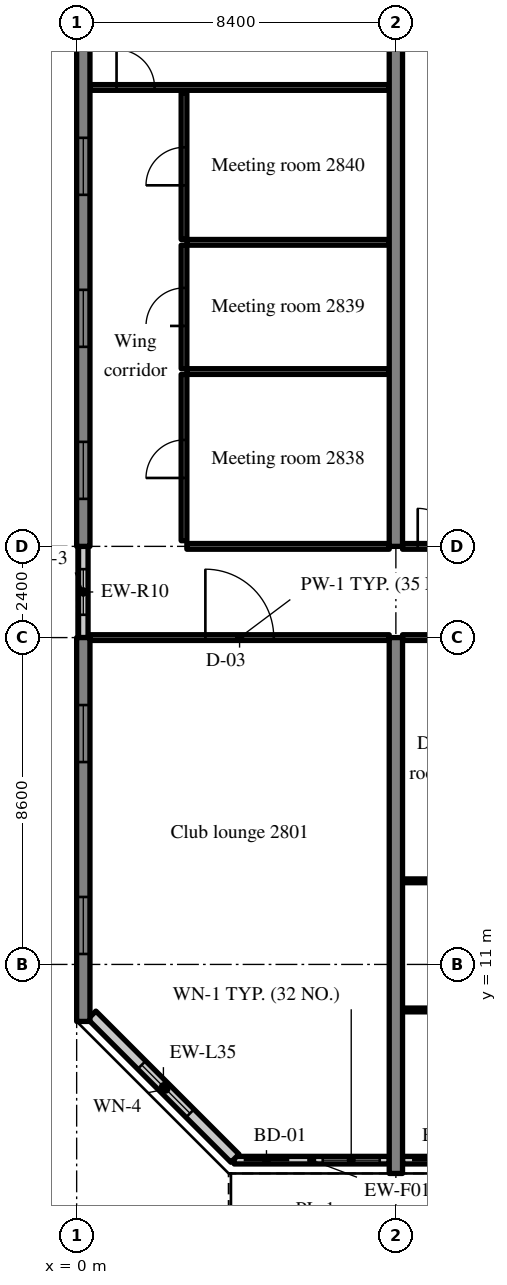
"""IFC4 building model, lengths in metres.
Left out: names, types, materials, properties, quantities, classifications, styles, units other than length and angle.
Written with IfcOpenShell. Run it as: python <this file> out.ifc"""

import sys

from ifc_helpers import new_model, si_unit, direction, frame, frame_2d, origin, place, context, subcontext, project, spatial, rectangle, extrude, source, transform, mapped, element, fill, save


model = new_model("IFC4")
c1 = context("Model", 3, precision=1e-05, world=origin(), true_north=direction((0.0, 1.0)))
c2 = subcontext(c1, "Body", "Model", "MODEL_VIEW")
j1 = project(units=[si_unit("LENGTHUNIT", "METRE"), si_unit("PLANEANGLEUNIT", "RADIAN")], contexts=[c1])
p1 = place(None, origin())
s1 = spatial("IfcSite", under=j1, at=p1, CompositionType="ELEMENT")
p2 = place(p1, origin())
s2 = spatial("IfcBuilding", under=s1, at=p2, CompositionType="ELEMENT")
p3 = place(p2, frame((0.0, 0.0, 118.0)))
s3 = spatial("IfcBuildingStorey", under=s2, at=p3, CompositionType="ELEMENT", Elevation=118.0)
m1 = source(origin(), c2, "Body", "SweptSolid", [
    extrude(rectangle(XDim=10.1, YDim=0.35, at=frame_2d((5.05, 0.0))), origin(), (0.0, 0.0, 1.0), 3.52),
])
p4 = place(p3, frame((0.175, 9.5, 0.0), z_axis=(0.0, 0.0, 1.0), x_axis=(0.0, 1.0, 0.0)))
e1 = element("IfcWall", 1, at=p4, inside=s3, PredefinedType="SHEAR", context=c2, shape_type="MappedRepresentation", body=[
    mapped(m1, transform((0.0, 0.0, 0.0), scale=1.0)),
])
m2 = source(origin(), c2, "Body", "SweptSolid", [
    extrude(rectangle(XDim=1.5, YDim=1.5, at=frame_2d((0.75, 0.75))), frame((0.0, 0.185, 0.0), z_axis=(0.0, -1.0, 0.0), x_axis=(1.0, 0.0, 0.0)), (0.0, 0.0, 1.0), 0.37),
])
p5 = place(p4, frame((1.775, 0.0, 0.9)))
e2 = element("IfcOpeningElement", 2, at=p5, cuts=e1, PredefinedType="OPENING", context=c2, shape_type="MappedRepresentation", body=[
    mapped(m2, transform((0.0, 0.0, 0.0), scale=1.0)),
])
p6 = place(p4, frame((6.825, 0.0, 0.9)))
e3 = element("IfcOpeningElement", 3, at=p6, cuts=e1, PredefinedType="OPENING", context=c2, shape_type="MappedRepresentation", body=[
    mapped(m2, transform((0.0, 0.0, 0.0), scale=1.0)),
])
m3 = source(origin(), c2, "Body", "SweptSolid", [
    extrude(rectangle(XDim=16.0, YDim=0.35, at=frame_2d((8.0, 0.0))), origin(), (0.0, 0.0, 1.0), 3.52),
])
p7 = place(p3, frame((0.175, 22.0, 0.0), z_axis=(0.0, 0.0, 1.0), x_axis=(0.0, 1.0, 0.0)))
e4 = element("IfcWall", 4, at=p7, inside=s3, PredefinedType="SHEAR", context=c2, shape_type="MappedRepresentation", body=[
    mapped(m3, transform((0.0, 0.0, 0.0), scale=1.0)),
])
p8 = place(p7, frame((1.25, 0.0, 0.9)))
e5 = element("IfcOpeningElement", 5, at=p8, cuts=e4, PredefinedType="OPENING", context=c2, shape_type="MappedRepresentation", body=[
    mapped(m2, transform((0.0, 0.0, 0.0), scale=1.0)),
])
p9 = place(p7, frame((5.25, 0.0, 0.9)))
e6 = element("IfcOpeningElement", 6, at=p9, cuts=e4, PredefinedType="OPENING", context=c2, shape_type="MappedRepresentation", body=[
    mapped(m2, transform((0.0, 0.0, 0.0), scale=1.0)),
])
p10 = place(p7, frame((9.25, 0.0, 0.9)))
e7 = element("IfcOpeningElement", 7, at=p10, cuts=e4, PredefinedType="OPENING", context=c2, shape_type="MappedRepresentation", body=[
    mapped(m2, transform((0.0, 0.0, 0.0), scale=1.0)),
])
p11 = place(p7, frame((13.25, 0.0, 0.9)))
e8 = element("IfcOpeningElement", 8, at=p11, cuts=e4, PredefinedType="OPENING", context=c2, shape_type="MappedRepresentation", body=[
    mapped(m2, transform((0.0, 0.0, 0.0), scale=1.0)),
])
m4 = source(origin(), c2, "Body", "SweptSolid", [
    extrude(rectangle(XDim=14.1, YDim=0.35, at=frame_2d((7.05, 0.0))), origin(), (0.0, 0.0, 1.0), 3.52),
])
p12 = place(p3, frame((8.4, 5.5, 0.0), z_axis=(0.0, 0.0, 1.0), x_axis=(0.0, 1.0, 0.0)))
e9 = element("IfcWall", 9, at=p12, inside=s3, PredefinedType="SHEAR", context=c2, shape_type="MappedRepresentation", body=[
    mapped(m4, transform((0.0, 0.0, 0.0), scale=1.0)),
])
m5 = source(origin(), c2, "Body", "SweptSolid", [
    extrude(rectangle(XDim=20.0, YDim=0.35, at=frame_2d((10.0, 0.0))), origin(), (0.0, 0.0, 1.0), 3.52),
])
p13 = place(p3, frame((8.4, 22.0, 0.0), z_axis=(0.0, 0.0, 1.0), x_axis=(0.0, 1.0, 0.0)))
e10 = element("IfcWall", 10, at=p13, inside=s3, PredefinedType="SHEAR", context=c2, shape_type="MappedRepresentation", body=[
    mapped(m5, transform((0.0, 0.0, 0.0), scale=1.0)),
])
m6 = source(origin(), c2, "Body", "SweptSolid", [
    extrude(rectangle(XDim=4.08, YDim=0.2, at=frame_2d((2.04, 0.0))), origin(), (0.0, 0.0, 1.0), 2.82),
])
p14 = place(p3, frame((4.145, 5.85, 0.0), z_axis=(0.0, 0.0, 1.0), x_axis=(1.0, 0.0, 0.0)))
e11 = element("IfcWall", 11, at=p14, inside=s3, PredefinedType="SOLIDWALL", context=c2, shape_type="MappedRepresentation", body=[
    mapped(m6, transform((0.0, 0.0, 0.0), scale=1.0)),
])
m7 = source(origin(), c2, "Body", "SweptSolid", [
    extrude(rectangle(XDim=1.2, YDim=2.4, at=frame_2d((0.6, 1.2))), frame((0.0, 0.11, 0.0), z_axis=(0.0, -1.0, 0.0), x_axis=(1.0, 0.0, 0.0)), (0.0, 0.0, 1.0), 0.22),
])
p15 = place(p14, frame((0.25, 0.0, 0.0)))
e12 = element("IfcOpeningElement", 12, at=p15, cuts=e11, PredefinedType="OPENING", context=c2, shape_type="MappedRepresentation", body=[
    mapped(m7, transform((0.0, 0.0, 0.0), scale=1.0)),
])
m8 = source(origin(), c2, "Body", "SweptSolid", [
    extrude(rectangle(XDim=1.5, YDim=1.5, at=frame_2d((0.75, 0.75))), frame((0.0, 0.11, 0.0), z_axis=(0.0, -1.0, 0.0), x_axis=(1.0, 0.0, 0.0)), (0.0, 0.0, 1.0), 0.22),
])
p16 = place(p14, frame((2.33, 0.0, 0.9)))
e13 = element("IfcOpeningElement", 13, at=p16, cuts=e11, PredefinedType="OPENING", context=c2, shape_type="MappedRepresentation", body=[
    mapped(m8, transform((0.0, 0.0, 0.0), scale=1.0)),
])
m9 = source(origin(), c2, "Body", "SweptSolid", [
    extrude(rectangle(XDim=8.05, YDim=0.2, at=frame_2d((4.025, 0.0))), origin(), (0.0, 0.0, 1.0), 2.82),
])
p17 = place(p3, frame((8.575, 5.85, 0.0), z_axis=(0.0, 0.0, 1.0), x_axis=(1.0, 0.0, 0.0)))
e14 = element("IfcWall", 14, at=p17, inside=s3, PredefinedType="SOLIDWALL", context=c2, shape_type="MappedRepresentation", body=[
    mapped(m9, transform((0.0, 0.0, 0.0), scale=1.0)),
])
p18 = place(p17, frame((0.25, 0.0, 0.0)))
e15 = element("IfcOpeningElement", 15, at=p18, cuts=e14, PredefinedType="OPENING", context=c2, shape_type="MappedRepresentation", body=[
    mapped(m7, transform((0.0, 0.0, 0.0), scale=1.0)),
])
p19 = place(p17, frame((2.275, 0.0, 0.9)))
e16 = element("IfcOpeningElement", 16, at=p19, cuts=e14, PredefinedType="OPENING", context=c2, shape_type="MappedRepresentation", body=[
    mapped(m8, transform((0.0, 0.0, 0.0), scale=1.0)),
])
p20 = place(p17, frame((4.275, 0.0, 0.0)))
e17 = element("IfcOpeningElement", 17, at=p20, cuts=e14, PredefinedType="OPENING", context=c2, shape_type="MappedRepresentation", body=[
    mapped(m7, transform((0.0, 0.0, 0.0), scale=1.0)),
])
p21 = place(p17, frame((6.3, 0.0, 0.9)))
e18 = element("IfcOpeningElement", 18, at=p21, cuts=e14, PredefinedType="OPENING", context=c2, shape_type="MappedRepresentation", body=[
    mapped(m8, transform((0.0, 0.0, 0.0), scale=1.0)),
])
m10 = source(origin(), c2, "Body", "SweptSolid", [
    extrude(rectangle(XDim=5.326, YDim=0.3, at=frame_2d((2.663, 0.0))), origin(), (0.0, 0.0, 1.0), 3.52),
])
p22 = place(p3, frame((0.4, 9.666, 0.0), z_axis=(0.0, 0.0, 1.0), x_axis=(0.707106781187, -0.707106781187, 0.0)))
e19 = element("IfcWall", 19, at=p22, inside=s3, PredefinedType="SOLIDWALL", context=c2, shape_type="MappedRepresentation", body=[
    mapped(m10, transform((0.0, 0.0, 0.0), scale=1.0)),
])
m11 = source(origin(), c2, "Body", "SweptSolid", [
    extrude(rectangle(XDim=1.8, YDim=1.5, at=frame_2d((0.9, 0.75))), frame((0.0, 0.16, 0.0), z_axis=(0.0, -1.0, 0.0), x_axis=(1.0, 0.0, 0.0)), (0.0, 0.0, 1.0), 0.32),
])
p23 = place(p22, frame((1.854, 0.0, 0.9)))
e20 = element("IfcOpeningElement", 20, at=p23, cuts=e19, PredefinedType="OPENING", context=c2, shape_type="MappedRepresentation", body=[
    mapped(m11, transform((0.0, 0.0, 0.0), scale=1.0)),
])
m12 = source(origin(), c2, "Body", "SweptSolid", [
    extrude(rectangle(XDim=2.4, YDim=0.25, at=frame_2d((1.2, 0.0))), origin(), (0.0, 0.0, 1.0), 2.62),
])
p24 = place(p3, frame((0.175, 19.6, 0.0), z_axis=(0.0, 0.0, 1.0), x_axis=(0.0, 1.0, 0.0)))
e21 = element("IfcWall", 21, at=p24, inside=s3, PredefinedType="SOLIDWALL", context=c2, shape_type="MappedRepresentation", body=[
    mapped(m12, transform((0.0, 0.0, 0.0), scale=1.0)),
])
m13 = source(origin(), c2, "Body", "SweptSolid", [
    extrude(rectangle(XDim=1.2, YDim=1.5, at=frame_2d((0.6, 0.75))), frame((0.0, 0.135, 0.0), z_axis=(0.0, -1.0, 0.0), x_axis=(1.0, 0.0, 0.0)), (0.0, 0.0, 1.0), 0.27),
])
p25 = place(p24, frame((0.6, 0.0, 0.9)))
e22 = element("IfcOpeningElement", 22, at=p25, cuts=e21, PredefinedType="OPENING", context=c2, shape_type="MappedRepresentation", body=[
    mapped(m13, transform((0.0, 0.0, 0.0), scale=1.0)),
])
m14 = source(origin(), c2, "Body", "SweptSolid", [
    extrude(rectangle(XDim=7.875, YDim=0.15, at=frame_2d((3.938, 0.0))), origin(), (0.0, 0.0, 1.0), 2.82),
])
p26 = place(p3, frame((0.35, 19.6, 0.0), z_axis=(0.0, 0.0, 1.0), x_axis=(1.0, 0.0, 0.0)))
e23 = element("IfcWall", 23, at=p26, inside=s3, PredefinedType="PARTITIONING", context=c2, shape_type="MappedRepresentation", body=[
    mapped(m14, transform((0.0, 0.0, 0.0), scale=1.0)),
])
m15 = source(origin(), c2, "Body", "SweptSolid", [
    extrude(rectangle(XDim=1.8, YDim=2.1, at=frame_2d((0.9, 1.05))), frame((0.0, 0.085, 0.0), z_axis=(0.0, -1.0, 0.0), x_axis=(1.0, 0.0, 0.0)), (0.0, 0.0, 1.0), 0.17),
])
p27 = place(p26, frame((3.037, 0.0, 0.0)))
e24 = element("IfcOpeningElement", 24, at=p27, cuts=e23, PredefinedType="OPENING", context=c2, shape_type="MappedRepresentation", body=[
    mapped(m15, transform((0.0, 0.0, 0.0), scale=1.0)),
])
m16 = source(origin(), c2, "Body", "SweptSolid", [
    extrude(rectangle(XDim=2.6, YDim=0.1, at=frame_2d((1.3, 0.0))), origin(), (0.0, 0.0, 1.0), 3.52),
])
p28 = place(p3, frame((8.575, 13.2, 0.0), z_axis=(0.0, 0.0, 1.0), x_axis=(1.0, 0.0, 0.0)))
e25 = element("IfcWall", 25, at=p28, inside=s3, PredefinedType="PARTITIONING", context=c2, shape_type="MappedRepresentation", body=[
    mapped(m16, transform((0.0, 0.0, 0.0), scale=1.0)),
])
m17 = source(origin(), c2, "Body", "SweptSolid", [
    extrude(rectangle(XDim=0.9, YDim=2.1, at=frame_2d((0.45, 1.05))), frame((0.0, 0.06, 0.0), z_axis=(0.0, -1.0, 0.0), x_axis=(1.0, 0.0, 0.0)), (0.0, 0.0, 1.0), 0.12),
])
p29 = place(p28, frame((0.85, 0.0, 0.0)))
e26 = element("IfcOpeningElement", 26, at=p29, cuts=e25, PredefinedType="OPENING", context=c2, shape_type="MappedRepresentation", body=[
    mapped(m17, transform((0.0, 0.0, 0.0), scale=1.0)),
])
m18 = source(origin(), c2, "Body", "SweptSolid", [
    extrude(rectangle(XDim=8.05, YDim=0.1, at=frame_2d((4.025, 0.0))), origin(), (0.0, 0.0, 1.0), 3.52),
])
p30 = place(p3, frame((8.575, 9.802, 0.0), z_axis=(0.0, 0.0, 1.0), x_axis=(1.0, 0.0, 0.0)))
e27 = element("IfcWall", 27, at=p30, inside=s3, PredefinedType="PARTITIONING", context=c2, shape_type="MappedRepresentation", body=[
    mapped(m18, transform((0.0, 0.0, 0.0), scale=1.0)),
])
m19 = source(origin(), c2, "Body", "SweptSolid", [
    extrude(rectangle(XDim=1.8, YDim=2.1, at=frame_2d((0.9, 1.05))), frame((0.0, 0.06, 0.0), z_axis=(0.0, -1.0, 0.0), x_axis=(1.0, 0.0, 0.0)), (0.0, 0.0, 1.0), 0.12),
])
p31 = place(p30, frame((3.125, 0.0, 0.0)))
e28 = element("IfcOpeningElement", 28, at=p31, cuts=e27, PredefinedType="OPENING", context=c2, shape_type="MappedRepresentation", body=[
    mapped(m19, transform((0.0, 0.0, 0.0), scale=1.0)),
])
m20 = source(origin(), c2, "Body", "SweptSolid", [
    extrude(rectangle(XDim=8.05, YDim=0.15, at=frame_2d((4.025, 0.0))), origin(), (0.0, 0.0, 1.0), 2.82),
])
p32 = place(p3, frame((8.575, 19.6, 0.0), z_axis=(0.0, 0.0, 1.0), x_axis=(1.0, 0.0, 0.0)))
e29 = element("IfcWall", 29, at=p32, inside=s3, PredefinedType="PARTITIONING", context=c2, shape_type="MappedRepresentation", body=[
    mapped(m20, transform((0.0, 0.0, 0.0), scale=1.0)),
])
m21 = source(origin(), c2, "Body", "SweptSolid", [
    extrude(rectangle(XDim=1.0, YDim=2.1, at=frame_2d((0.5, 1.05))), frame((0.0, 0.085, 0.0), z_axis=(0.0, -1.0, 0.0), x_axis=(1.0, 0.0, 0.0)), (0.0, 0.0, 1.0), 0.17),
])
p33 = place(p32, frame((6.65, 0.0, 0.0)))
e30 = element("IfcOpeningElement", 30, at=p33, cuts=e29, PredefinedType="OPENING", context=c2, shape_type="MappedRepresentation", body=[
    mapped(m21, transform((0.0, 0.0, 0.0), scale=1.0)),
])
m22 = source(origin(), c2, "Body", "SweptSolid", [
    extrude(rectangle(XDim=5.325, YDim=0.15, at=frame_2d((2.663, 0.0))), origin(), (0.0, 0.0, 1.0), 2.82),
])
p34 = place(p3, frame((2.9, 22.0, 0.0), z_axis=(0.0, 0.0, 1.0), x_axis=(1.0, 0.0, 0.0)))
e31 = element("IfcWall", 31, at=p34, inside=s3, PredefinedType="PARTITIONING", context=c2, shape_type="MappedRepresentation", body=[
    mapped(m22, transform((0.0, 0.0, 0.0), scale=1.0)),
])
m23 = source(origin(), c2, "Body", "SweptSolid", [
    extrude(rectangle(XDim=4.375, YDim=0.15, at=frame_2d((2.188, 0.0))), origin(), (0.0, 0.0, 1.0), 3.52),
])
p35 = place(p3, frame((2.825, 22.15, 0.0), z_axis=(0.0, 0.0, 1.0), x_axis=(0.0, 1.0, 0.0)))
e32 = element("IfcWall", 32, at=p35, inside=s3, PredefinedType="PARTITIONING", context=c2, shape_type="MappedRepresentation", body=[
    mapped(m23, transform((0.0, 0.0, 0.0), scale=1.0)),
])
p36 = place(p35, frame((1.65, 0.0, 0.0)))
e33 = element("IfcOpeningElement", 33, at=p36, cuts=e32, PredefinedType="OPENING", context=c2, shape_type="MappedRepresentation", body=[
    mapped(m21, transform((0.0, 0.0, 0.0), scale=1.0)),
])
m24 = source(origin(), c2, "Body", "SweptSolid", [
    extrude(rectangle(XDim=5.325, YDim=0.15, at=frame_2d((2.663, 0.0))), origin(), (0.0, 0.0, 1.0), 3.52),
])
p37 = place(p3, frame((2.9, 26.6, 0.0), z_axis=(0.0, 0.0, 1.0), x_axis=(1.0, 0.0, 0.0)))
e34 = element("IfcWall", 34, at=p37, inside=s3, PredefinedType="PARTITIONING", context=c2, shape_type="MappedRepresentation", body=[
    mapped(m24, transform((0.0, 0.0, 0.0), scale=1.0)),
])
m25 = source(origin(), c2, "Body", "SweptSolid", [
    extrude(rectangle(XDim=3.25, YDim=0.15, at=frame_2d((1.625, 0.0))), origin(), (0.0, 0.0, 1.0), 3.52),
])
p38 = place(p3, frame((2.825, 26.675, 0.0), z_axis=(0.0, 0.0, 1.0), x_axis=(0.0, 1.0, 0.0)))
e35 = element("IfcWall", 35, at=p38, inside=s3, PredefinedType="PARTITIONING", context=c2, shape_type="MappedRepresentation", body=[
    mapped(m25, transform((0.0, 0.0, 0.0), scale=1.0)),
])
p39 = place(p38, frame((1.125, 0.0, 0.0)))
e36 = element("IfcOpeningElement", 36, at=p39, cuts=e35, PredefinedType="OPENING", context=c2, shape_type="MappedRepresentation", body=[
    mapped(m21, transform((0.0, 0.0, 0.0), scale=1.0)),
])
p40 = place(p3, frame((2.9, 30.0, 0.0), z_axis=(0.0, 0.0, 1.0), x_axis=(1.0, 0.0, 0.0)))
e37 = element("IfcWall", 37, at=p40, inside=s3, PredefinedType="PARTITIONING", context=c2, shape_type="MappedRepresentation", body=[
    mapped(m24, transform((0.0, 0.0, 0.0), scale=1.0)),
])
m26 = source(origin(), c2, "Body", "SweptSolid", [
    extrude(rectangle(XDim=3.85, YDim=0.15, at=frame_2d((1.925, 0.0))), origin(), (0.0, 0.0, 1.0), 3.52),
])
p41 = place(p3, frame((2.825, 30.075, 0.0), z_axis=(0.0, 0.0, 1.0), x_axis=(0.0, 1.0, 0.0)))
e38 = element("IfcWall", 38, at=p41, inside=s3, PredefinedType="PARTITIONING", context=c2, shape_type="MappedRepresentation", body=[
    mapped(m26, transform((0.0, 0.0, 0.0), scale=1.0)),
])
p42 = place(p41, frame((1.425, 0.0, 0.0)))
e39 = element("IfcOpeningElement", 39, at=p42, cuts=e38, PredefinedType="OPENING", context=c2, shape_type="MappedRepresentation", body=[
    mapped(m21, transform((0.0, 0.0, 0.0), scale=1.0)),
])
m27 = source(origin(), c2, "Body", "SweptSolid", [
    extrude(rectangle(XDim=7.875, YDim=0.15, at=frame_2d((3.938, 0.0))), origin(), (0.0, 0.0, 1.0), 3.52),
])
p43 = place(p3, frame((0.35, 34.075, 0.0), z_axis=(0.0, 0.0, 1.0), x_axis=(1.0, 0.0, 0.0)))
e40 = element("IfcWall", 40, at=p43, inside=s3, PredefinedType="PARTITIONING", context=c2, shape_type="MappedRepresentation", body=[
    mapped(m27, transform((0.0, 0.0, 0.0), scale=1.0)),
])
p44 = place(p43, frame((0.7, 0.0, 0.0)))
e41 = element("IfcOpeningElement", 41, at=p44, cuts=e40, PredefinedType="OPENING", context=c2, shape_type="MappedRepresentation", body=[
    mapped(m21, transform((0.0, 0.0, 0.0), scale=1.0)),
])
p45 = place(p3, frame((8.575, 22.0, 0.0), z_axis=(0.0, 0.0, 1.0), x_axis=(1.0, 0.0, 0.0)))
e42 = element("IfcWall", 42, at=p45, inside=s3, PredefinedType="PARTITIONING", context=c2, shape_type="MappedRepresentation", body=[
    mapped(m20, transform((0.0, 0.0, 0.0), scale=1.0)),
])
p46 = place(p45, frame((0.4, 0.0, 0.0)))
e43 = element("IfcOpeningElement", 43, at=p46, cuts=e42, PredefinedType="OPENING", context=c2, shape_type="MappedRepresentation", body=[
    mapped(m21, transform((0.0, 0.0, 0.0), scale=1.0)),
])
m28 = source(origin(), c2, "Body", "SweptSolid", [
    extrude(rectangle(XDim=1.2, YDim=2.4, at=frame_2d((0.6, 1.2))), frame((0.0, 0.025, 0.0), z_axis=(0.0, -1.0, 0.0), x_axis=(1.0, 0.0, 0.0)), (0.0, 0.0, 1.0), 0.05),
])
p47 = place(p15, origin())
e44 = element("IfcDoor", 44, at=p47, inside=s3, OperationType="SLIDING_TO_LEFT", PredefinedType="DOOR", context=c2, shape_type="MappedRepresentation", body=[
    mapped(m28, transform((0.0, 0.0, 0.0), scale=1.0)),
])
fill(e12, e44)
m29 = source(origin(), c2, "Body", "SweptSolid", [
    extrude(rectangle(XDim=1.5, YDim=1.5, at=frame_2d((0.75, 0.75))), frame((0.0, 0.03, 0.0), z_axis=(0.0, -1.0, 0.0), x_axis=(1.0, 0.0, 0.0)), (0.0, 0.0, 1.0), 0.06),
])
p48 = place(p16, origin())
e45 = element("IfcWindow", 45, at=p48, inside=s3, PartitioningType="SINGLE_PANEL", PredefinedType="WINDOW", context=c2, shape_type="MappedRepresentation", body=[
    mapped(m29, transform((0.0, 0.0, 0.0), scale=1.0)),
])
fill(e13, e45)
p49 = place(p18, origin())
e46 = element("IfcDoor", 46, at=p49, inside=s3, OperationType="SLIDING_TO_RIGHT", PredefinedType="DOOR", context=c2, shape_type="MappedRepresentation", body=[
    mapped(m28, transform((0.0, 0.0, 0.0), scale=1.0)),
])
fill(e15, e46)
m30 = source(origin(), c2, "Body", "SweptSolid", [
    extrude(rectangle(XDim=1.8, YDim=1.5, at=frame_2d((0.9, 0.75))), frame((0.0, 0.03, 0.0), z_axis=(0.0, -1.0, 0.0), x_axis=(1.0, 0.0, 0.0)), (0.0, 0.0, 1.0), 0.06),
])
p50 = place(p23, origin())
e47 = element("IfcWindow", 47, at=p50, inside=s3, PartitioningType="SINGLE_PANEL", PredefinedType="WINDOW", context=c2, shape_type="MappedRepresentation", body=[
    mapped(m30, transform((0.0, 0.0, 0.0), scale=1.0)),
])
fill(e20, e47)
p51 = place(p5, origin())
e48 = element("IfcWindow", 48, at=p51, inside=s3, PartitioningType="SINGLE_PANEL", PredefinedType="WINDOW", context=c2, shape_type="MappedRepresentation", body=[
    mapped(m29, transform((0.0, 0.0, 0.0), scale=1.0)),
])
fill(e2, e48)
p52 = place(p6, origin())
e49 = element("IfcWindow", 49, at=p52, inside=s3, PartitioningType="SINGLE_PANEL", PredefinedType="WINDOW", context=c2, shape_type="MappedRepresentation", body=[
    mapped(m29, transform((0.0, 0.0, 0.0), scale=1.0)),
])
fill(e3, e49)
p53 = place(p8, origin())
e50 = element("IfcWindow", 50, at=p53, inside=s3, PartitioningType="SINGLE_PANEL", PredefinedType="WINDOW", context=c2, shape_type="MappedRepresentation", body=[
    mapped(m29, transform((0.0, 0.0, 0.0), scale=1.0)),
])
fill(e5, e50)
p54 = place(p9, origin())
e51 = element("IfcWindow", 51, at=p54, inside=s3, PartitioningType="SINGLE_PANEL", PredefinedType="WINDOW", context=c2, shape_type="MappedRepresentation", body=[
    mapped(m29, transform((0.0, 0.0, 0.0), scale=1.0)),
])
fill(e6, e51)
p55 = place(p10, origin())
e52 = element("IfcWindow", 52, at=p55, inside=s3, PartitioningType="SINGLE_PANEL", PredefinedType="WINDOW", context=c2, shape_type="MappedRepresentation", body=[
    mapped(m29, transform((0.0, 0.0, 0.0), scale=1.0)),
])
fill(e7, e52)
m31 = source(origin(), c2, "Body", "SweptSolid", [
    extrude(rectangle(XDim=1.2, YDim=1.5, at=frame_2d((0.6, 0.75))), frame((0.0, 0.03, 0.0), z_axis=(0.0, -1.0, 0.0), x_axis=(1.0, 0.0, 0.0)), (0.0, 0.0, 1.0), 0.06),
])
p56 = place(p25, origin())
e53 = element("IfcWindow", 53, at=p56, inside=s3, PartitioningType="SINGLE_PANEL", PredefinedType="WINDOW", context=c2, shape_type="MappedRepresentation", body=[
    mapped(m31, transform((0.0, 0.0, 0.0), scale=1.0)),
])
fill(e22, e53)
m32 = source(origin(), c2, "Body", "SweptSolid", [
    extrude(rectangle(XDim=1.8, YDim=2.1, at=frame_2d((0.9, 1.05))), frame((0.0, 0.025, 0.0), z_axis=(0.0, -1.0, 0.0), x_axis=(1.0, 0.0, 0.0)), (0.0, 0.0, 1.0), 0.05),
])
p57 = place(p27, origin())
e54 = element("IfcDoor", 54, at=p57, inside=s3, OperationType="DOUBLE_DOOR_SINGLE_SWING", PredefinedType="DOOR", context=c2, shape_type="MappedRepresentation", body=[
    mapped(m32, transform((0.0, 0.0, 0.0), scale=1.0)),
])
fill(e24, e54)
m33 = source(origin(), c2, "Body", "SweptSolid", [
    extrude(rectangle(XDim=1.0, YDim=2.1, at=frame_2d((0.5, 1.05))), frame((0.0, 0.025, 0.0), z_axis=(0.0, -1.0, 0.0), x_axis=(1.0, 0.0, 0.0)), (0.0, 0.0, 1.0), 0.05),
])
p58 = place(p36, origin())
e55 = element("IfcDoor", 55, at=p58, inside=s3, OperationType="SINGLE_SWING_LEFT", PredefinedType="DOOR", context=c2, shape_type="MappedRepresentation", body=[
    mapped(m33, transform((0.0, 0.0, 0.0), scale=1.0)),
])
fill(e33, e55)
p59 = place(p39, origin())
e56 = element("IfcDoor", 56, at=p59, inside=s3, OperationType="SINGLE_SWING_LEFT", PredefinedType="DOOR", context=c2, shape_type="MappedRepresentation", body=[
    mapped(m33, transform((0.0, 0.0, 0.0), scale=1.0)),
])
fill(e36, e56)
p60 = place(p42, origin())
e57 = element("IfcDoor", 57, at=p60, inside=s3, OperationType="SINGLE_SWING_LEFT", PredefinedType="DOOR", context=c2, shape_type="MappedRepresentation", body=[
    mapped(m33, transform((0.0, 0.0, 0.0), scale=1.0)),
])
fill(e39, e57)
p61 = place(p44, origin())
e58 = element("IfcDoor", 58, at=p61, inside=s3, OperationType="SINGLE_SWING_LEFT", PredefinedType="DOOR", context=c2, shape_type="MappedRepresentation", body=[
    mapped(m33, transform((0.0, 0.0, 0.0), scale=1.0)),
])
fill(e41, e58)
p62 = place(p46, origin())
e59 = element("IfcDoor", 59, at=p62, inside=s3, OperationType="SINGLE_SWING_LEFT", PredefinedType="DOOR", context=c2, shape_type="MappedRepresentation", body=[
    mapped(m33, transform((0.0, 0.0, 0.0), scale=1.0)),
])
fill(e43, e59)
save(model, sys.argv[1])
